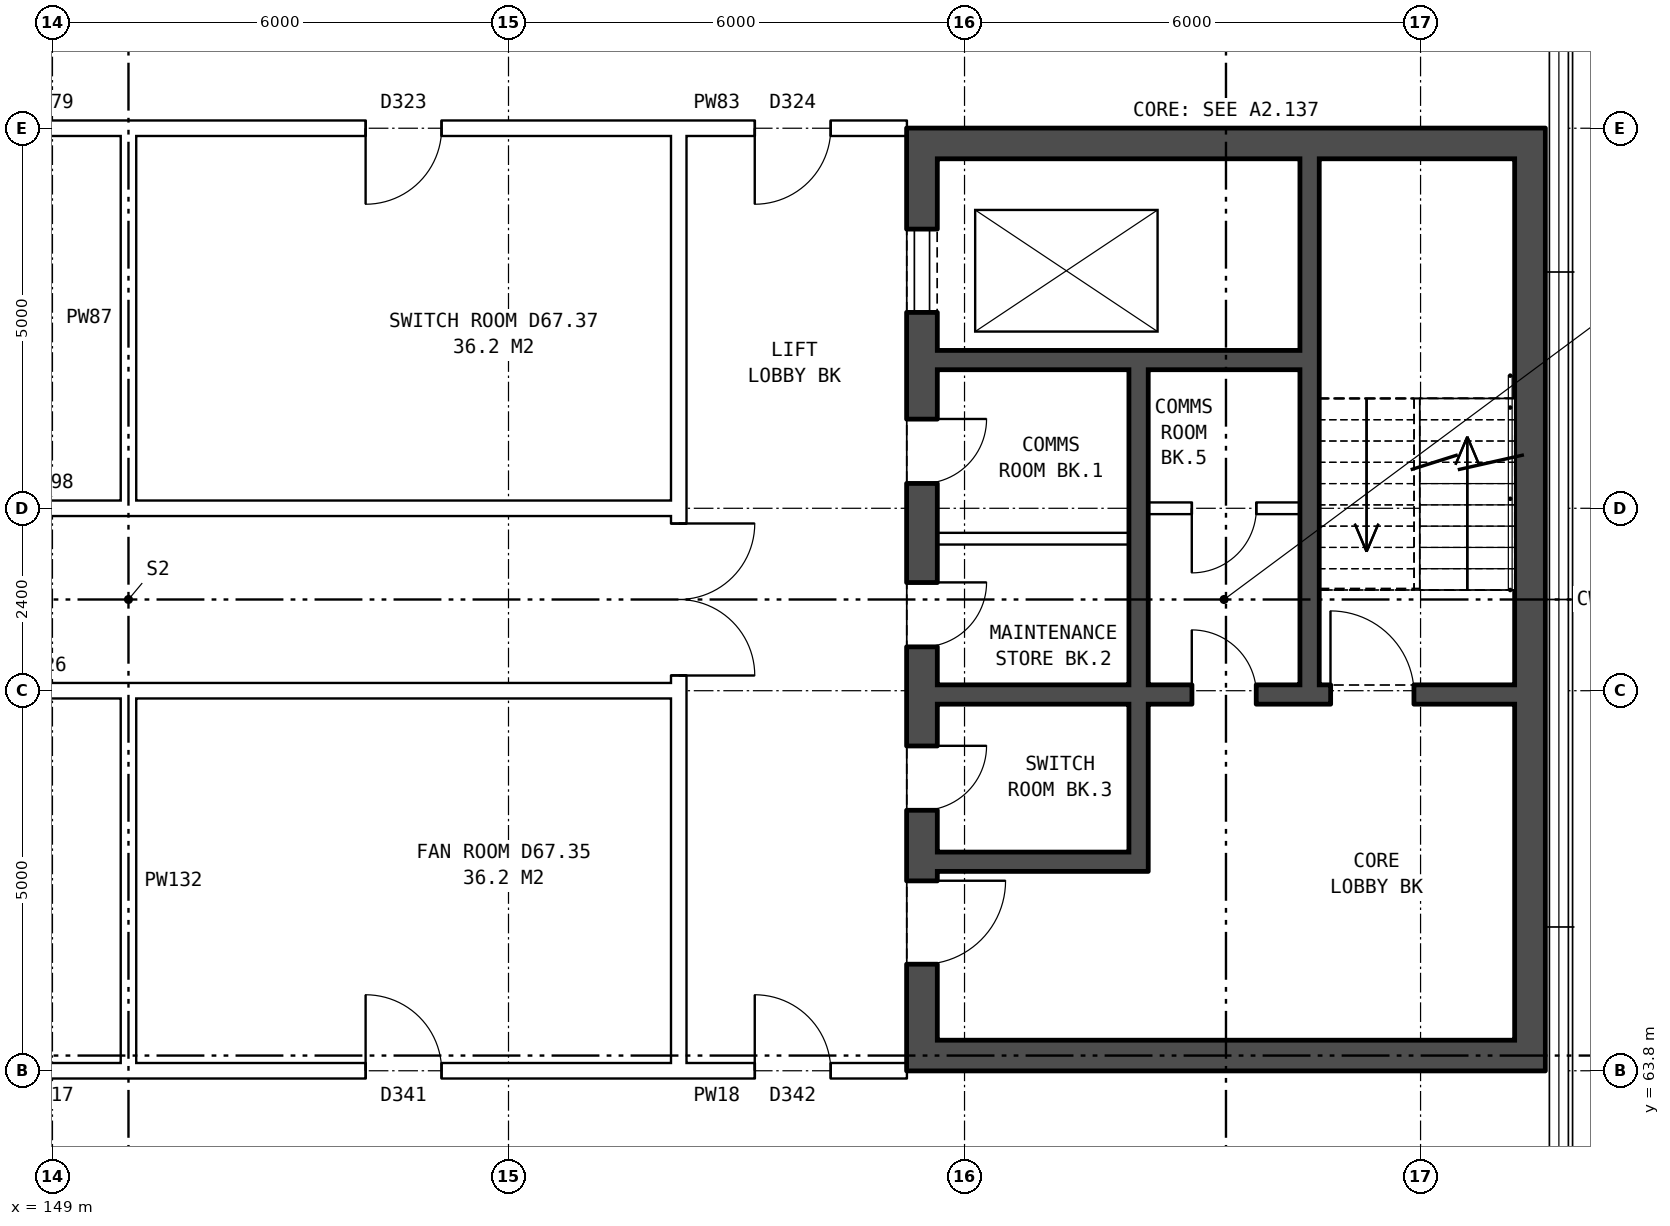
"""IFC4 building model, lengths in metres.
Left out: names, types, materials, properties, quantities, classifications, styles, units other than length and angle.
Written with IfcOpenShell. Run it as: python <this file> out.ifc"""

import sys

from ifc_helpers import new_model, si_unit, direction, frame, frame_2d, origin, place, context, subcontext, project, spatial, rectangle, extrude, element, fill, save


model = new_model("IFC4")
c1 = context("Model", 3, precision=1e-05, world=origin(), true_north=direction((0.0, 1.0)))
c2 = subcontext(c1, "Body", "Model", "MODEL_VIEW")
j1 = project(units=[si_unit("LENGTHUNIT", "METRE"), si_unit("PLANEANGLEUNIT", "RADIAN")], contexts=[c1])
p1 = place(None, origin())
s1 = spatial("IfcSite", under=j1, at=p1, CompositionType="ELEMENT")
p2 = place(p1, origin())
s2 = spatial("IfcBuilding", under=s1, at=p2, CompositionType="ELEMENT")
p3 = place(p2, frame((0.0, 0.0, 236.9)))
s3 = spatial("IfcBuildingStorey", under=s2, at=p3, CompositionType="ELEMENT", Elevation=236.9)
p4 = place(p3, frame((160.44, 76.2, 0.0), z_axis=(0.0, 0.0, 1.0), x_axis=(0.0, -1.0, 0.0)))
e1 = element("IfcWall", 1, at=p4, inside=s3, PredefinedType="SHEAR", context=c2, shape_type="SweptSolid", body=[
    extrude(rectangle(XDim=12.4, YDim=0.4, at=frame_2d((6.2, 0.0))), origin(), (0.0, 0.0, 1.0), 6.7),
])
p5 = place(p4, frame((1.325, 0.0, 0.0)))
e2 = element("IfcOpeningElement", 2, at=p5, cuts=e1, PredefinedType="OPENING", context=c2, shape_type="SweptSolid", body=[
    extrude(rectangle(XDim=1.1, YDim=2.1, at=frame_2d((0.55, 1.05))), frame((0.0, 0.21, 0.0), z_axis=(0.0, -1.0, 0.0), x_axis=(1.0, 0.0, 0.0)), (0.0, 0.0, 1.0), 0.42),
])
p6 = place(p4, frame((3.825, 0.0, 0.0)))
e3 = element("IfcOpeningElement", 3, at=p6, cuts=e1, PredefinedType="OPENING", context=c2, shape_type="SweptSolid", body=[
    extrude(rectangle(XDim=0.85, YDim=2.1, at=frame_2d((0.425, 1.05))), frame((0.0, 0.21, 0.0), z_axis=(0.0, -1.0, 0.0), x_axis=(1.0, 0.0, 0.0)), (0.0, 0.0, 1.0), 0.42),
])
p7 = place(p4, frame((5.975, 0.0, 0.0)))
e4 = element("IfcOpeningElement", 4, at=p7, cuts=e1, PredefinedType="OPENING", context=c2, shape_type="SweptSolid", body=[
    extrude(rectangle(XDim=0.85, YDim=2.1, at=frame_2d((0.425, 1.05))), frame((0.0, 0.21, 0.0), z_axis=(0.0, -1.0, 0.0), x_axis=(1.0, 0.0, 0.0)), (0.0, 0.0, 1.0), 0.42),
])
p8 = place(p4, frame((9.9, 0.0, 0.0)))
e5 = element("IfcOpeningElement", 5, at=p8, cuts=e1, PredefinedType="OPENING", context=c2, shape_type="SweptSolid", body=[
    extrude(rectangle(XDim=1.1, YDim=2.1, at=frame_2d((0.55, 1.05))), frame((0.0, 0.21, 0.0), z_axis=(0.0, -1.0, 0.0), x_axis=(1.0, 0.0, 0.0)), (0.0, 0.0, 1.0), 0.42),
])
p9 = place(p4, frame((8.125, 0.0, 0.0)))
e6 = element("IfcOpeningElement", 6, at=p9, cuts=e1, PredefinedType="OPENING", context=c2, shape_type="SweptSolid", body=[
    extrude(rectangle(XDim=0.85, YDim=2.1, at=frame_2d((0.425, 1.05))), frame((0.0, 0.21, 0.0), z_axis=(0.0, -1.0, 0.0), x_axis=(1.0, 0.0, 0.0)), (0.0, 0.0, 1.0), 0.42),
])
p10 = place(p3, frame((168.44, 76.2, 0.0), z_axis=(0.0, 0.0, 1.0), x_axis=(0.0, -1.0, 0.0)))
e7 = element("IfcWall", 7, at=p10, inside=s3, PredefinedType="SHEAR", context=c2, shape_type="SweptSolid", body=[
    extrude(rectangle(XDim=12.4, YDim=0.4, at=frame_2d((6.2, 0.0))), origin(), (0.0, 0.0, 1.0), 6.7),
])
for number, where, z_axis, x_axis in (
    (8, (160.64, 76.0, 0.0), (0.0, 0.0, 1.0), (1.0, 0.0, 0.0)),
    (9, (160.64, 64.0, 0.0), (0.0, 0.0, 1.0), (1.0, 0.0, 0.0)),
):
    element("IfcWall", number, at=place(p3, frame(where, z_axis=z_axis, x_axis=x_axis)), inside=s3, PredefinedType="SHEAR", context=c2, shape_type="SweptSolid", body=[
        extrude(rectangle(XDim=7.6, YDim=0.4, at=frame_2d((3.8, 0.0))), origin(), (0.0, 0.0, 1.0), 6.7),
    ])
p11 = place(p3, frame((160.64, 73.15, 0.0), z_axis=(0.0, 0.0, 1.0), x_axis=(1.0, 0.0, 0.0)))
e10 = element("IfcWall", 10, at=p11, inside=s3, PredefinedType="SHEAR", context=c2, shape_type="SweptSolid", body=[
    extrude(rectangle(XDim=4.775, YDim=0.25, at=frame_2d((2.388, 0.0))), origin(), (0.0, 0.0, 1.0), 6.7),
])
p12 = place(p3, frame((163.415, 71.2, 0.0), z_axis=(0.0, 0.0, 1.0), x_axis=(1.0, 0.0, 0.0)))
e11 = element("IfcWall", 11, at=p12, inside=s3, PredefinedType="PARTITIONING", context=c2, shape_type="SweptSolid", body=[
    extrude(rectangle(XDim=2.0, YDim=0.15, at=frame_2d((1.0, 0.0))), origin(), (0.0, 0.0, 1.0), 6.7),
])
p13 = place(p12, frame((0.575, 0.0, 0.0)))
e12 = element("IfcOpeningElement", 12, at=p13, cuts=e11, PredefinedType="OPENING", context=c2, shape_type="SweptSolid", body=[
    extrude(rectangle(XDim=0.85, YDim=2.1, at=frame_2d((0.425, 1.05))), frame((0.0, 0.085, 0.0), z_axis=(0.0, -1.0, 0.0), x_axis=(1.0, 0.0, 0.0)), (0.0, 0.0, 1.0), 0.17),
])
p14 = place(p3, frame((160.64, 70.8, 0.0), z_axis=(0.0, 0.0, 1.0), x_axis=(1.0, 0.0, 0.0)))
e13 = element("IfcWall", 13, at=p14, inside=s3, PredefinedType="PARTITIONING", context=c2, shape_type="SweptSolid", body=[
    extrude(rectangle(XDim=2.525, YDim=0.15, at=frame_2d((1.263, 0.0))), origin(), (0.0, 0.0, 1.0), 6.7),
])
p15 = place(p3, frame((160.64, 68.75, 0.0), z_axis=(0.0, 0.0, 1.0), x_axis=(1.0, 0.0, 0.0)))
e14 = element("IfcWall", 14, at=p15, inside=s3, PredefinedType="SHEAR", context=c2, shape_type="SweptSolid", body=[
    extrude(rectangle(XDim=7.6, YDim=0.25, at=frame_2d((3.8, 0.0))), origin(), (0.0, 0.0, 1.0), 6.7),
])
p16 = place(p15, frame((5.175, 0.0, 0.0)))
e15 = element("IfcOpeningElement", 15, at=p16, cuts=e14, PredefinedType="OPENING", context=c2, shape_type="SweptSolid", body=[
    extrude(rectangle(XDim=1.1, YDim=2.1, at=frame_2d((0.55, 1.05))), frame((0.0, 0.135, 0.0), z_axis=(0.0, -1.0, 0.0), x_axis=(1.0, 0.0, 0.0)), (0.0, 0.0, 1.0), 0.27),
])
p17 = place(p15, frame((3.35, 0.0, 0.0)))
e16 = element("IfcOpeningElement", 16, at=p17, cuts=e14, PredefinedType="OPENING", context=c2, shape_type="SweptSolid", body=[
    extrude(rectangle(XDim=0.85, YDim=2.1, at=frame_2d((0.425, 1.05))), frame((0.0, 0.135, 0.0), z_axis=(0.0, -1.0, 0.0), x_axis=(1.0, 0.0, 0.0)), (0.0, 0.0, 1.0), 0.27),
])
p18 = place(p3, frame((160.64, 66.55, 0.0), z_axis=(0.0, 0.0, 1.0), x_axis=(1.0, 0.0, 0.0)))
e17 = element("IfcWall", 17, at=p18, inside=s3, PredefinedType="SHEAR", context=c2, shape_type="SweptSolid", body=[
    extrude(rectangle(XDim=2.525, YDim=0.25, at=frame_2d((1.263, 0.0))), origin(), (0.0, 0.0, 1.0), 6.7),
])
p19 = place(p3, frame((163.29, 73.025, 0.0), z_axis=(0.0, 0.0, 1.0), x_axis=(0.0, -1.0, 0.0)))
e18 = element("IfcWall", 18, at=p19, inside=s3, PredefinedType="SHEAR", context=c2, shape_type="SweptSolid", body=[
    extrude(rectangle(XDim=4.15, YDim=0.25, at=frame_2d((2.075, 0.0))), origin(), (0.0, 0.0, 1.0), 6.7),
])
p20 = place(p3, frame((163.29, 68.625, 0.0), z_axis=(0.0, 0.0, 1.0), x_axis=(0.0, -1.0, 0.0)))
e19 = element("IfcWall", 19, at=p20, inside=s3, PredefinedType="SHEAR", context=c2, shape_type="SweptSolid", body=[
    extrude(rectangle(XDim=2.2, YDim=0.25, at=frame_2d((1.1, 0.0))), origin(), (0.0, 0.0, 1.0), 6.7),
])
p21 = place(p3, frame((165.54, 75.8, 0.0), z_axis=(0.0, 0.0, 1.0), x_axis=(0.0, -1.0, 0.0)))
e20 = element("IfcWall", 20, at=p21, inside=s3, PredefinedType="SHEAR", context=c2, shape_type="SweptSolid", body=[
    extrude(rectangle(XDim=6.925, YDim=0.25, at=frame_2d((3.462, 0.0))), origin(), (0.0, 0.0, 1.0), 6.7),
])
p22 = place(p3, frame((157.24, 63.9, 0.0), z_axis=(0.0, 0.0, 1.0), x_axis=(0.0, 1.0, 0.0)))
e21 = element("IfcWall", 21, at=p22, inside=s3, PredefinedType="PARTITIONING", context=c2, shape_type="SweptSolid", body=[
    extrude(rectangle(XDim=12.2, YDim=0.2, at=frame_2d((6.1, 0.0))), origin(), (0.0, 0.0, 1.0), 6.7),
])
p23 = place(p22, frame((5.1, 0.0, 0.0)))
e22 = element("IfcOpeningElement", 22, at=p23, cuts=e21, PredefinedType="OPENING", context=c2, shape_type="SweptSolid", body=[
    extrude(rectangle(XDim=2.0, YDim=2.1, at=frame_2d((1.0, 1.05))), frame((0.0, 0.11, 0.0), z_axis=(0.0, -1.0, 0.0), x_axis=(1.0, 0.0, 0.0)), (0.0, 0.0, 1.0), 0.22),
])
p24 = place(p3, frame((142.76, 63.8, 0.0), z_axis=(0.0, 0.0, 1.0), x_axis=(1.0, 0.0, 0.0)))
e23 = element("IfcWall", 23, at=p24, inside=s3, PredefinedType="PARTITIONING", context=c2, shape_type="SweptSolid", body=[
    extrude(rectangle(XDim=14.48, YDim=0.2, at=frame_2d((7.24, 0.0))), origin(), (0.0, 0.0, 1.0), 6.7),
])
p25 = place(p24, frame((3.12, 0.0, 0.0)))
e24 = element("IfcOpeningElement", 24, at=p25, cuts=e23, PredefinedType="OPENING", context=c2, shape_type="SweptSolid", body=[
    extrude(rectangle(XDim=1.0, YDim=2.1, at=frame_2d((0.5, 1.05))), frame((0.0, 0.11, 0.0), z_axis=(0.0, -1.0, 0.0), x_axis=(1.0, 0.0, 0.0)), (0.0, 0.0, 1.0), 0.22),
])
p26 = place(p24, frame((10.36, 0.0, 0.0)))
e25 = element("IfcOpeningElement", 25, at=p26, cuts=e23, PredefinedType="OPENING", context=c2, shape_type="SweptSolid", body=[
    extrude(rectangle(XDim=1.0, YDim=2.1, at=frame_2d((0.5, 1.05))), frame((0.0, 0.11, 0.0), z_axis=(0.0, -1.0, 0.0), x_axis=(1.0, 0.0, 0.0)), (0.0, 0.0, 1.0), 0.22),
])
p27 = place(p3, frame((157.24, 63.8, 0.0), z_axis=(0.0, 0.0, 1.0), x_axis=(1.0, 0.0, 0.0)))
e26 = element("IfcWall", 26, at=p27, inside=s3, PredefinedType="PARTITIONING", context=c2, shape_type="SweptSolid", body=[
    extrude(rectangle(XDim=3.0, YDim=0.2, at=frame_2d((1.5, 0.0))), origin(), (0.0, 0.0, 1.0), 6.7),
])
p28 = place(p27, frame((1.0, 0.0, 0.0)))
e27 = element("IfcOpeningElement", 27, at=p28, cuts=e26, PredefinedType="OPENING", context=c2, shape_type="SweptSolid", body=[
    extrude(rectangle(XDim=1.0, YDim=2.1, at=frame_2d((0.5, 1.05))), frame((0.0, 0.11, 0.0), z_axis=(0.0, -1.0, 0.0), x_axis=(1.0, 0.0, 0.0)), (0.0, 0.0, 1.0), 0.22),
])
for number, where, z_axis, x_axis in (
    (28, (142.76, 68.8, 0.0), (0.0, 0.0, 1.0), (1.0, 0.0, 0.0)),
    (29, (142.76, 71.2, 0.0), (0.0, 0.0, 1.0), (1.0, 0.0, 0.0)),
):
    element("IfcWall", number, at=place(p3, frame(where, z_axis=z_axis, x_axis=x_axis)), inside=s3, PredefinedType="PARTITIONING", context=c2, shape_type="SweptSolid", body=[
        extrude(rectangle(XDim=14.48, YDim=0.2, at=frame_2d((7.24, 0.0))), origin(), (0.0, 0.0, 1.0), 6.7),
    ])
p29 = place(p3, frame((142.76, 76.2, 0.0), z_axis=(0.0, 0.0, 1.0), x_axis=(1.0, 0.0, 0.0)))
e30 = element("IfcWall", 30, at=p29, inside=s3, PredefinedType="PARTITIONING", context=c2, shape_type="SweptSolid", body=[
    extrude(rectangle(XDim=14.48, YDim=0.2, at=frame_2d((7.24, 0.0))), origin(), (0.0, 0.0, 1.0), 6.7),
])
p30 = place(p29, frame((3.12, 0.0, 0.0)))
e31 = element("IfcOpeningElement", 31, at=p30, cuts=e30, PredefinedType="OPENING", context=c2, shape_type="SweptSolid", body=[
    extrude(rectangle(XDim=1.0, YDim=2.1, at=frame_2d((0.5, 1.05))), frame((0.0, 0.11, 0.0), z_axis=(0.0, -1.0, 0.0), x_axis=(1.0, 0.0, 0.0)), (0.0, 0.0, 1.0), 0.22),
])
p31 = place(p29, frame((10.36, 0.0, 0.0)))
e32 = element("IfcOpeningElement", 32, at=p31, cuts=e30, PredefinedType="OPENING", context=c2, shape_type="SweptSolid", body=[
    extrude(rectangle(XDim=1.0, YDim=2.1, at=frame_2d((0.5, 1.05))), frame((0.0, 0.11, 0.0), z_axis=(0.0, -1.0, 0.0), x_axis=(1.0, 0.0, 0.0)), (0.0, 0.0, 1.0), 0.22),
])
p32 = place(p3, frame((157.24, 76.2, 0.0), z_axis=(0.0, 0.0, 1.0), x_axis=(1.0, 0.0, 0.0)))
e33 = element("IfcWall", 33, at=p32, inside=s3, PredefinedType="PARTITIONING", context=c2, shape_type="SweptSolid", body=[
    extrude(rectangle(XDim=3.0, YDim=0.2, at=frame_2d((1.5, 0.0))), origin(), (0.0, 0.0, 1.0), 6.7),
])
p33 = place(p32, frame((1.0, 0.0, 0.0)))
e34 = element("IfcOpeningElement", 34, at=p33, cuts=e33, PredefinedType="OPENING", context=c2, shape_type="SweptSolid", body=[
    extrude(rectangle(XDim=1.0, YDim=2.1, at=frame_2d((0.5, 1.05))), frame((0.0, 0.11, 0.0), z_axis=(0.0, -1.0, 0.0), x_axis=(1.0, 0.0, 0.0)), (0.0, 0.0, 1.0), 0.22),
])
for number, where, z_axis, x_axis in (
    (35, (150.0, 63.7, 0.0), (0.0, 0.0, 1.0), (0.0, 1.0, 0.0)),
    (36, (150.0, 71.1, 0.0), (0.0, 0.0, 1.0), (0.0, 1.0, 0.0)),
):
    element("IfcWall", number, at=place(p3, frame(where, z_axis=z_axis, x_axis=x_axis)), inside=s3, PredefinedType="PARTITIONING", context=c2, shape_type="SweptSolid", body=[
        extrude(rectangle(XDim=5.2, YDim=0.2, at=frame_2d((2.6, 0.0))), origin(), (0.0, 0.0, 1.0), 6.7),
    ])
p34 = place(p5, origin())
e37 = element("IfcDoor", 37, at=p34, inside=s3, OperationType="DOUBLE_DOOR_SLIDING", PredefinedType="DOOR", context=c2, shape_type="SweptSolid", body=[
    extrude(rectangle(XDim=1.1, YDim=2.1, at=frame_2d((0.55, 1.05))), frame((0.0, 0.185, 0.0), z_axis=(0.0, -1.0, 0.0), x_axis=(1.0, 0.0, 0.0)), (0.0, 0.0, 1.0), 0.05),
])
fill(e2, e37)
p35 = place(p6, origin())
e38 = element("IfcDoor", 38, at=p35, inside=s3, OperationType="SINGLE_SWING_LEFT", PredefinedType="DOOR", context=c2, shape_type="SweptSolid", body=[
    extrude(rectangle(XDim=0.85, YDim=2.1, at=frame_2d((0.425, 1.05))), frame((0.0, 0.185, 0.0), z_axis=(0.0, -1.0, 0.0), x_axis=(1.0, 0.0, 0.0)), (0.0, 0.0, 1.0), 0.05),
])
fill(e3, e38)
p36 = place(p7, origin())
e39 = element("IfcDoor", 39, at=p36, inside=s3, OperationType="SINGLE_SWING_LEFT", PredefinedType="DOOR", context=c2, shape_type="SweptSolid", body=[
    extrude(rectangle(XDim=0.85, YDim=2.1, at=frame_2d((0.425, 1.05))), frame((0.0, 0.185, 0.0), z_axis=(0.0, -1.0, 0.0), x_axis=(1.0, 0.0, 0.0)), (0.0, 0.0, 1.0), 0.05),
])
fill(e4, e39)
p37 = place(p8, origin())
e40 = element("IfcDoor", 40, at=p37, inside=s3, OperationType="SINGLE_SWING_LEFT", PredefinedType="DOOR", context=c2, shape_type="SweptSolid", body=[
    extrude(rectangle(XDim=1.1, YDim=2.1, at=frame_2d((0.55, 1.05))), frame((0.0, 0.185, 0.0), z_axis=(0.0, -1.0, 0.0), x_axis=(1.0, 0.0, 0.0)), (0.0, 0.0, 1.0), 0.05),
])
fill(e5, e40)
p38 = place(p16, origin())
e41 = element("IfcDoor", 41, at=p38, inside=s3, OperationType="SINGLE_SWING_LEFT", PredefinedType="DOOR", context=c2, shape_type="SweptSolid", body=[
    extrude(rectangle(XDim=1.1, YDim=2.1, at=frame_2d((0.55, 1.05))), frame((0.0, 0.025, 0.0), z_axis=(0.0, -1.0, 0.0), x_axis=(1.0, 0.0, 0.0)), (0.0, 0.0, 1.0), 0.05),
])
fill(e15, e41)
p39 = place(p9, origin())
e42 = element("IfcDoor", 42, at=p39, inside=s3, OperationType="SINGLE_SWING_LEFT", PredefinedType="DOOR", context=c2, shape_type="SweptSolid", body=[
    extrude(rectangle(XDim=0.85, YDim=2.1, at=frame_2d((0.425, 1.05))), frame((0.0, 0.185, 0.0), z_axis=(0.0, -1.0, 0.0), x_axis=(1.0, 0.0, 0.0)), (0.0, 0.0, 1.0), 0.05),
])
fill(e6, e42)
p40 = place(p17, origin())
e43 = element("IfcDoor", 43, at=p40, inside=s3, OperationType="SINGLE_SWING_LEFT", PredefinedType="DOOR", context=c2, shape_type="SweptSolid", body=[
    extrude(rectangle(XDim=0.85, YDim=2.1, at=frame_2d((0.425, 1.05))), frame((0.0, 0.025, 0.0), z_axis=(0.0, -1.0, 0.0), x_axis=(1.0, 0.0, 0.0)), (0.0, 0.0, 1.0), 0.05),
])
fill(e16, e43)
p41 = place(p13, frame((0.85, 0.0, 0.0), z_axis=(0.0, 0.0, 1.0), x_axis=(-1.0, 0.0, 0.0)))
e44 = element("IfcDoor", 44, at=p41, inside=s3, OperationType="SINGLE_SWING_RIGHT", PredefinedType="DOOR", context=c2, shape_type="SweptSolid", body=[
    extrude(rectangle(XDim=0.85, YDim=2.1, at=frame_2d((0.425, 1.05))), frame((0.0, 0.025, 0.0), z_axis=(0.0, -1.0, 0.0), x_axis=(1.0, 0.0, 0.0)), (0.0, 0.0, 1.0), 0.05),
])
fill(e12, e44)
p42 = place(p23, frame((2.0, 0.0, 0.0), z_axis=(0.0, 0.0, 1.0), x_axis=(-1.0, 0.0, 0.0)))
e45 = element("IfcDoor", 45, at=p42, inside=s3, OperationType="DOUBLE_DOOR_SINGLE_SWING", PredefinedType="DOOR", context=c2, shape_type="SweptSolid", body=[
    extrude(rectangle(XDim=2.0, YDim=2.1, at=frame_2d((1.0, 1.05))), frame((0.0, 0.025, 0.0), z_axis=(0.0, -1.0, 0.0), x_axis=(1.0, 0.0, 0.0)), (0.0, 0.0, 1.0), 0.05),
])
fill(e22, e45)
p43 = place(p26, origin())
e46 = element("IfcDoor", 46, at=p43, inside=s3, OperationType="SINGLE_SWING_LEFT", PredefinedType="DOOR", context=c2, shape_type="SweptSolid", body=[
    extrude(rectangle(XDim=1.0, YDim=2.1, at=frame_2d((0.5, 1.05))), frame((0.0, 0.025, 0.0), z_axis=(0.0, -1.0, 0.0), x_axis=(1.0, 0.0, 0.0)), (0.0, 0.0, 1.0), 0.05),
])
fill(e25, e46)
p44 = place(p28, origin())
e47 = element("IfcDoor", 47, at=p44, inside=s3, OperationType="SINGLE_SWING_LEFT", PredefinedType="DOOR", context=c2, shape_type="SweptSolid", body=[
    extrude(rectangle(XDim=1.0, YDim=2.1, at=frame_2d((0.5, 1.05))), frame((0.0, 0.025, 0.0), z_axis=(0.0, -1.0, 0.0), x_axis=(1.0, 0.0, 0.0)), (0.0, 0.0, 1.0), 0.05),
])
fill(e27, e47)
p45 = place(p31, frame((1.0, 0.0, 0.0), z_axis=(0.0, 0.0, 1.0), x_axis=(-1.0, 0.0, 0.0)))
e48 = element("IfcDoor", 48, at=p45, inside=s3, OperationType="SINGLE_SWING_RIGHT", PredefinedType="DOOR", context=c2, shape_type="SweptSolid", body=[
    extrude(rectangle(XDim=1.0, YDim=2.1, at=frame_2d((0.5, 1.05))), frame((0.0, 0.025, 0.0), z_axis=(0.0, -1.0, 0.0), x_axis=(1.0, 0.0, 0.0)), (0.0, 0.0, 1.0), 0.05),
])
fill(e32, e48)
p46 = place(p33, frame((1.0, 0.0, 0.0), z_axis=(0.0, 0.0, 1.0), x_axis=(-1.0, 0.0, 0.0)))
e49 = element("IfcDoor", 49, at=p46, inside=s3, OperationType="SINGLE_SWING_RIGHT", PredefinedType="DOOR", context=c2, shape_type="SweptSolid", body=[
    extrude(rectangle(XDim=1.0, YDim=2.1, at=frame_2d((0.5, 1.05))), frame((0.0, 0.025, 0.0), z_axis=(0.0, -1.0, 0.0), x_axis=(1.0, 0.0, 0.0)), (0.0, 0.0, 1.0), 0.05),
])
fill(e34, e49)
save(model, sys.argv[1])
